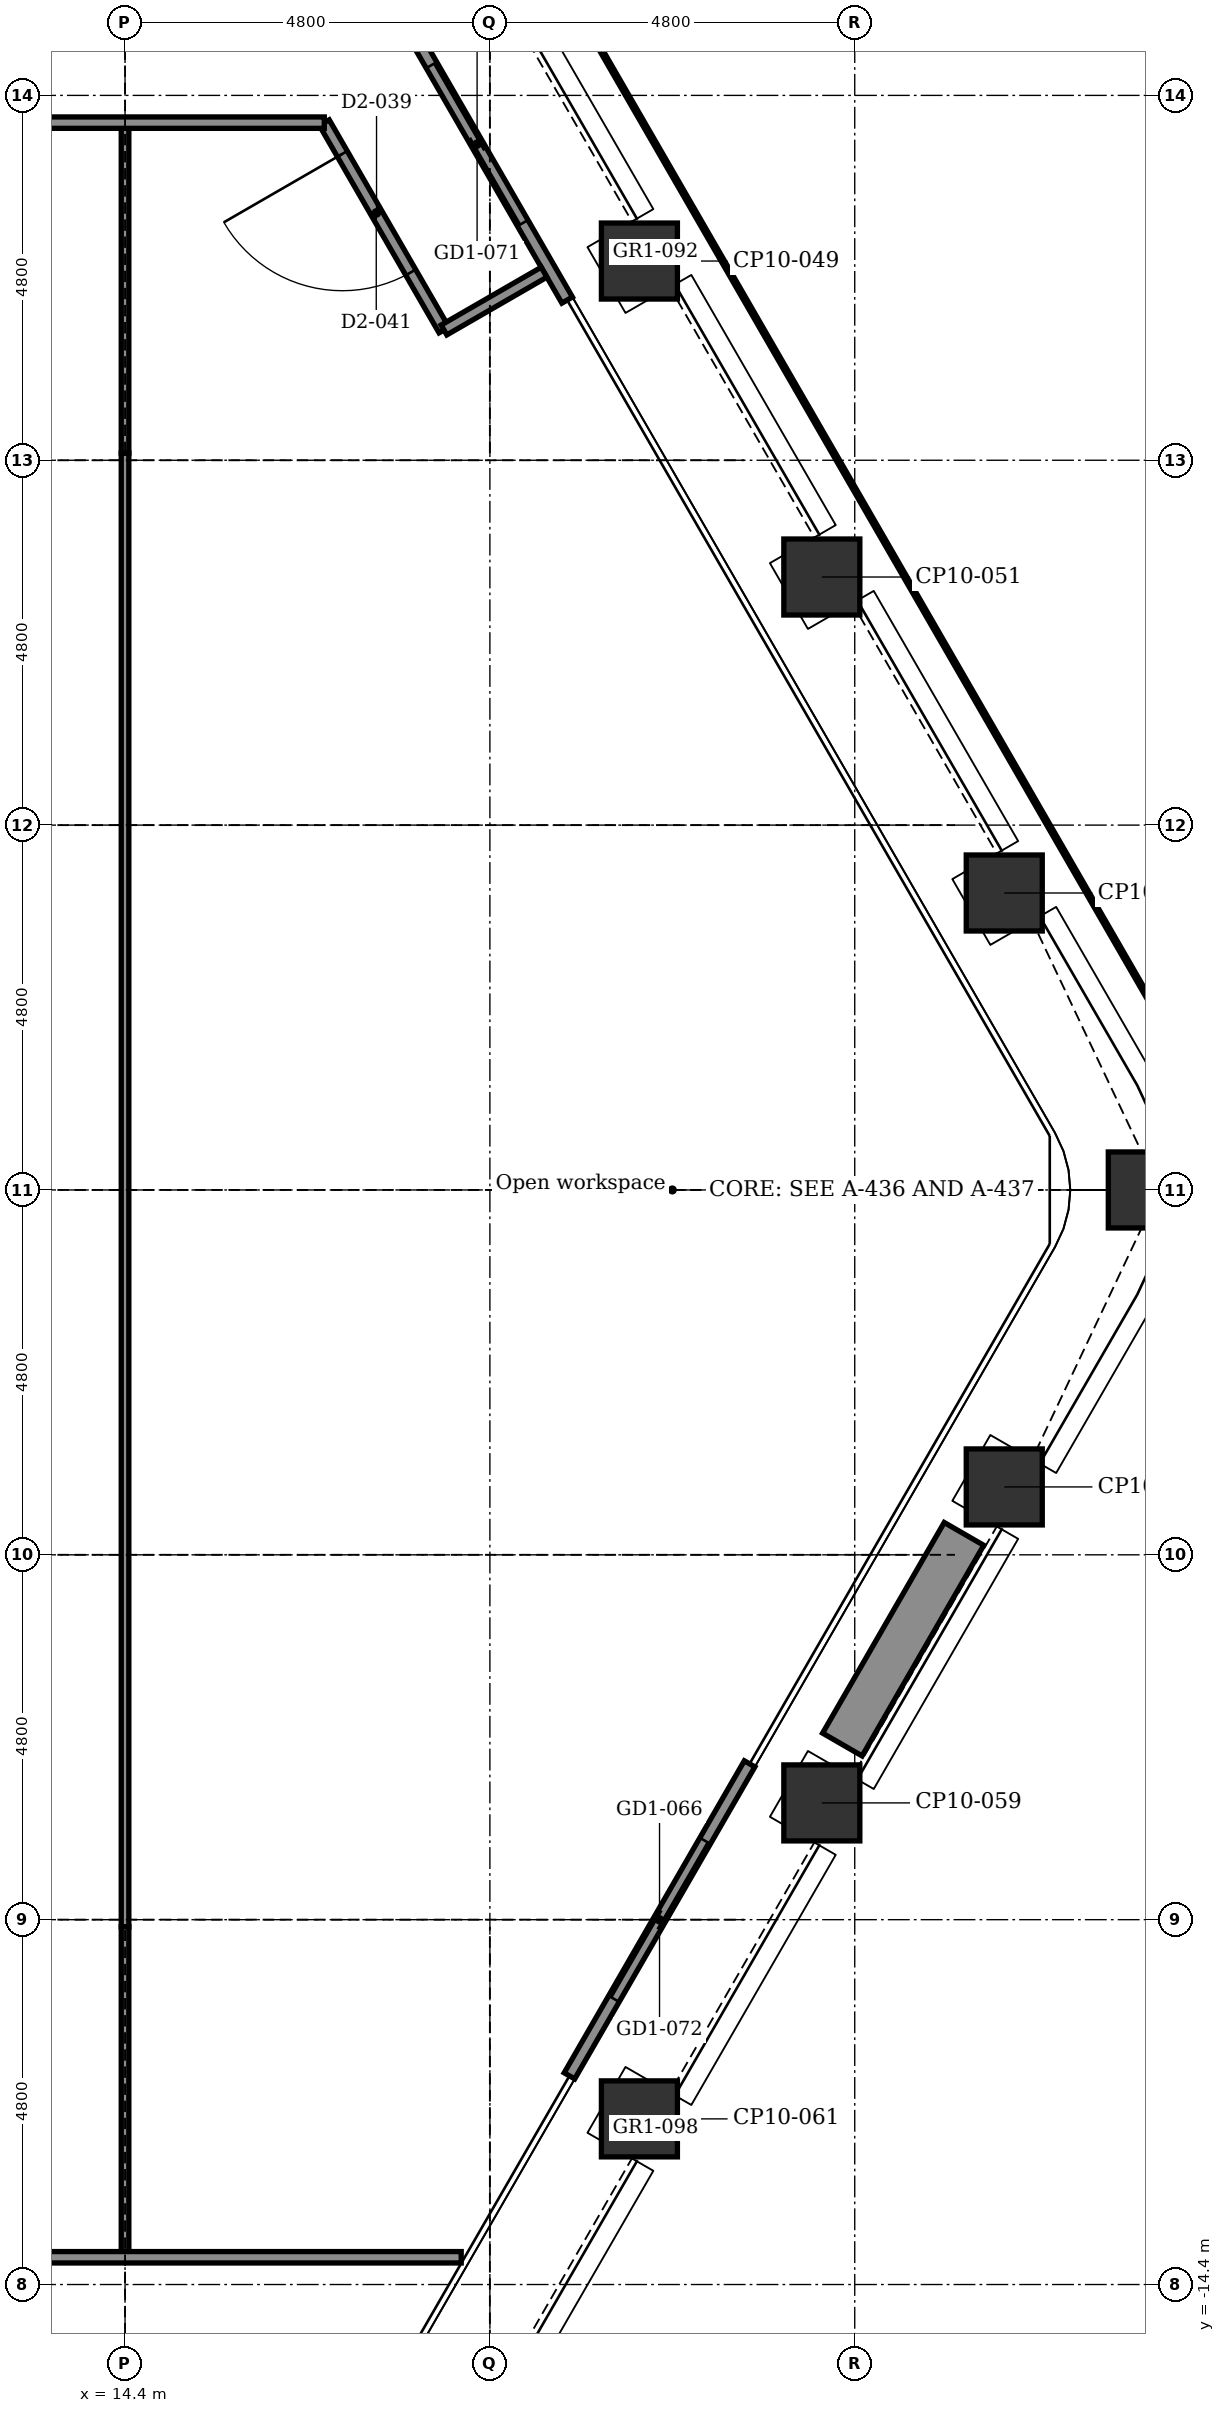
"""IFC4 building model, lengths in metres.
Left out: names, types, materials, properties, quantities, classifications, styles, units other than length and angle.
Written with IfcOpenShell. Run it as: python <this file> out.ifc"""

import sys

from ifc_helpers import new_model, si_unit, direction, frame, frame_2d, origin, origin_2d, place, context, subcontext, project, spatial, rectangle, extrude, element, fill, save


model = new_model("IFC4")
c1 = context("Model", 3, precision=1e-05, world=origin(), true_north=direction((0.0, 1.0)))
c2 = subcontext(c1, "Body", "Model", "MODEL_VIEW")
j1 = project(units=[si_unit("LENGTHUNIT", "METRE"), si_unit("PLANEANGLEUNIT", "RADIAN")], contexts=[c1])
p1 = place(None, origin())
s1 = spatial("IfcSite", under=j1, at=p1, CompositionType="ELEMENT")
p2 = place(p1, origin())
s2 = spatial("IfcBuilding", under=s1, at=p2, CompositionType="ELEMENT")
p3 = place(p2, frame((0.0, 0.0, 138.8)))
s3 = spatial("IfcBuildingStorey", under=s2, at=p3, CompositionType="ELEMENT", Elevation=138.8)
for number, where, z_axis, x_axis in (
    (1, (21.167, 12.221, -0.15), (0.0, 0.0, 1.0), (0.866, 0.5, 0.0)),
    (2, (23.567, 8.064, -0.15), (0.0, 0.0, 1.0), (0.866, 0.5, 0.0)),
    (3, (25.967, 3.907, -0.15), (0.0, 0.0, 1.0), (0.866, 0.5, 0.0)),
    (4, (27.836, 0.0, -0.15), (0.0, 0.0, 1.0), (1.0, 0.0, 0.0)),
    (5, (25.967, -3.907, -0.15), (0.0, 0.0, 1.0), (0.5, 0.866, 0.0)),
    (6, (23.567, -8.064, -0.15), (0.0, 0.0, 1.0), (0.5, 0.866, 0.0)),
    (7, (21.167, -12.221, -0.15), (0.0, 0.0, 1.0), (0.5, 0.866, 0.0)),
):
    element("IfcColumn", number, at=place(p3, frame(where, z_axis=z_axis, x_axis=x_axis)), inside=s3, PredefinedType="COLUMN", context=c2, shape_type="SweptSolid", body=[
        extrude(rectangle(XDim=1.0, YDim=1.0, at=origin_2d()), origin(), (0.0, 0.0, 1.0), 3.9),
    ])
p4 = place(p3, frame((17.847, 15.812, 0.0), z_axis=(0.0, 0.0, 1.0), x_axis=(0.5000167099, -0.866015756104, 0.0)))
e8 = element("IfcWall", 8, at=p4, inside=s3, PredefinedType="PARTITIONING", context=c2, shape_type="SweptSolid", body=[
    extrude(rectangle(XDim=4.74, YDim=0.16, at=frame_2d((2.37, 0.0))), origin(), (0.0, 0.0, 1.0), 3.75),
])
p5 = place(p4, frame((1.17, 0.0, 0.0)))
e9 = element("IfcOpeningElement", 9, at=p5, cuts=e8, PredefinedType="OPENING", context=c2, shape_type="SweptSolid", body=[
    extrude(rectangle(XDim=2.4, YDim=2.4, at=frame_2d((1.2, 1.2))), frame((0.0, 0.09, 0.0), z_axis=(0.0, -1.0, 0.0), x_axis=(1.0, 0.0, 0.0)), (0.0, 0.0, 1.0), 0.18),
])
p6 = place(p3, frame((22.617, -7.55, 0.0), z_axis=(0.0, 0.0, 1.0), x_axis=(-0.5000167099, -0.866015756104, 0.0)))
e10 = element("IfcWall", 10, at=p6, inside=s3, PredefinedType="PARTITIONING", context=c2, shape_type="SweptSolid", body=[
    extrude(rectangle(XDim=4.74, YDim=0.16, at=frame_2d((2.37, 0.0))), origin(), (0.0, 0.0, 1.0), 3.75),
])
p7 = place(p6, frame((1.17, 0.0, 0.0)))
e11 = element("IfcOpeningElement", 11, at=p7, cuts=e10, PredefinedType="OPENING", context=c2, shape_type="SweptSolid", body=[
    extrude(rectangle(XDim=2.4, YDim=2.4, at=frame_2d((1.2, 1.2))), frame((0.0, 0.09, 0.0), z_axis=(0.0, -1.0, 0.0), x_axis=(1.0, 0.0, 0.0)), (0.0, 0.0, 1.0), 0.18),
])
p8 = place(p3, frame((25.437, -4.525, 0.0), z_axis=(0.0, 0.0, 1.0), x_axis=(-0.499938187974, -0.866061088033, 0.0)))
e12 = element("IfcWall", 12, at=p8, inside=s3, PredefinedType="USERDEFINED", context=c2, shape_type="SweptSolid", body=[
    extrude(rectangle(XDim=3.2, YDim=0.6, at=frame_2d((1.6, 0.0))), origin(), (0.0, 0.0, 1.0), 0.7),
])
p9 = place(p3, frame((14.4, -9.694, 0.0), z_axis=(0.0, 0.0, 1.0), x_axis=(0.0, 1.0, 0.0)))
e13 = element("IfcWall", 13, at=p9, inside=s3, PredefinedType="PARTITIONING", context=c2, shape_type="SweptSolid", body=[
    extrude(rectangle(XDim=19.387, YDim=0.1, at=frame_2d((9.694, 0.0))), origin(), (0.0, 0.0, 1.0), 3.75),
])
for number, where, z_axis, x_axis in (
    (14, (14.4, -14.042, 0.0), (0.0, 0.0, 1.0), (0.0, 1.0, 0.0)),
    (15, (14.4, 9.694, 0.0), (0.0, 0.0, 1.0), (0.0, 1.0, 0.0)),
):
    element("IfcWall", number, at=place(p3, frame(where, z_axis=z_axis, x_axis=x_axis)), inside=s3, PredefinedType="PARTITIONING", context=c2, shape_type="SweptSolid", body=[
        extrude(rectangle(XDim=4.348, YDim=0.1, at=frame_2d((2.174, 0.0))), origin(), (0.0, 0.0, 1.0), 3.066),
    ])
p10 = place(p3, frame((17.021, 14.042, 0.0), z_axis=(0.0, 0.0, 1.0), x_axis=(0.499957296199, -0.866050057432, 0.0)))
e16 = element("IfcWall", 16, at=p10, inside=s3, PredefinedType="PARTITIONING", context=c2, shape_type="SweptSolid", body=[
    extrude(rectangle(XDim=3.15, YDim=0.15, at=frame_2d((1.575, 0.0))), origin(), (0.0, 0.0, 1.0), 3.75),
])
p11 = place(p10, frame((0.475, 0.0, 0.0)))
e17 = element("IfcOpeningElement", 17, at=p11, cuts=e16, PredefinedType="OPENING", context=c2, shape_type="SweptSolid", body=[
    extrude(rectangle(XDim=1.8, YDim=2.1, at=frame_2d((0.9, 1.05))), frame((0.0, 0.085, 0.0), z_axis=(0.0, -1.0, 0.0), x_axis=(1.0, 0.0, 0.0)), (0.0, 0.0, 1.0), 0.17),
])
p12 = place(p3, frame((18.596, 11.314, 0.0), z_axis=(0.0, 0.0, 1.0), x_axis=(0.866030456496, 0.499991248344, 0.0)))
e18 = element("IfcWall", 18, at=p12, inside=s3, PredefinedType="PARTITIONING", context=c2, shape_type="SweptSolid", body=[
    extrude(rectangle(XDim=1.52, YDim=0.15, at=frame_2d((0.76, 0.0))), origin(), (0.0, 0.0, 1.0), 3.75),
])
p13 = place(p3, frame((6.0, -14.042, 0.0), z_axis=(0.0, 0.0, 1.0), x_axis=(1.0, 0.0, 0.0)))
e19 = element("IfcWall", 19, at=p13, inside=s3, PredefinedType="PARTITIONING", context=c2, shape_type="SweptSolid", body=[
    extrude(rectangle(XDim=12.823, YDim=0.15, at=frame_2d((6.411, 0.0))), origin(), (0.0, 0.0, 1.0), 3.75),
])
p14 = place(p3, frame((7.2, 14.042, 0.0), z_axis=(0.0, 0.0, 1.0), x_axis=(1.0, 0.0, 0.0)))
e20 = element("IfcWall", 20, at=p14, inside=s3, PredefinedType="PARTITIONING", context=c2, shape_type="SweptSolid", body=[
    extrude(rectangle(XDim=9.821, YDim=0.15, at=frame_2d((4.911, 0.0))), origin(), (0.0, 0.0, 1.0), 3.75),
])
p15 = place(p14, frame((3.865, 0.0, 0.0)))
e21 = element("IfcOpeningElement", 21, at=p15, cuts=e20, PredefinedType="OPENING", context=c2, shape_type="SweptSolid", body=[
    extrude(rectangle(XDim=1.0, YDim=2.1, at=frame_2d((0.5, 1.05))), frame((0.0, 0.085, 0.0), z_axis=(0.0, -1.0, 0.0), x_axis=(1.0, 0.0, 0.0)), (0.0, 0.0, 1.0), 0.17),
])
p16 = place(p5, origin())
e22 = element("IfcDoor", 22, at=p16, inside=s3, OperationType="DOUBLE_DOOR_SLIDING", PredefinedType="DOOR", context=c2, shape_type="SweptSolid", body=[
    extrude(rectangle(XDim=2.4, YDim=2.4, at=frame_2d((1.2, 1.2))), frame((0.0, 0.025, 0.0), z_axis=(0.0, -1.0, 0.0), x_axis=(1.0, 0.0, 0.0)), (0.0, 0.0, 1.0), 0.05),
])
fill(e9, e22)
p17 = place(p7, origin())
e23 = element("IfcDoor", 23, at=p17, inside=s3, OperationType="DOUBLE_DOOR_SLIDING", PredefinedType="DOOR", context=c2, shape_type="SweptSolid", body=[
    extrude(rectangle(XDim=2.4, YDim=2.4, at=frame_2d((1.2, 1.2))), frame((0.0, 0.025, 0.0), z_axis=(0.0, -1.0, 0.0), x_axis=(1.0, 0.0, 0.0)), (0.0, 0.0, 1.0), 0.05),
])
fill(e11, e23)
p18 = place(p11, frame((1.8, 0.0, 0.0), z_axis=(0.0, 0.0, 1.0), x_axis=(-1.0, 0.0, 0.0)))
e24 = element("IfcDoor", 24, at=p18, inside=s3, OperationType="SINGLE_SWING_LEFT", PredefinedType="DOOR", context=c2, shape_type="SweptSolid", body=[
    extrude(rectangle(XDim=1.8, YDim=2.1, at=frame_2d((0.9, 1.05))), frame((0.0, 0.025, 0.0), z_axis=(0.0, -1.0, 0.0), x_axis=(1.0, 0.0, 0.0)), (0.0, 0.0, 1.0), 0.05),
])
fill(e17, e24)
save(model, sys.argv[1])
